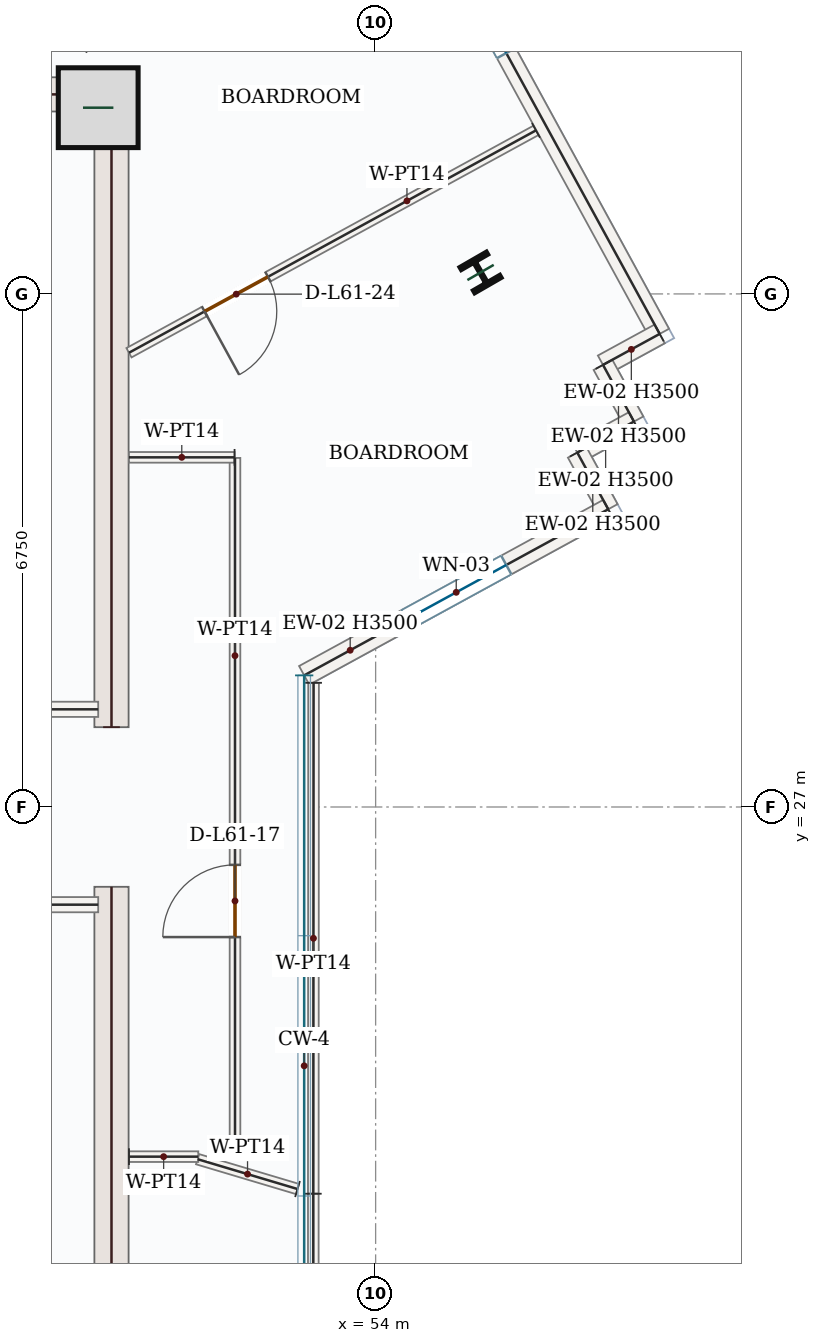
"""IFC4 building model, lengths in metres.
Left out: names, types, materials, properties, quantities, classifications, styles, units other than length and angle.
Written with IfcOpenShell. Run it as: python <this file> out.ifc"""

import sys

from ifc_helpers import new_model, si_unit, direction, frame, frame_2d, origin, origin_2d, place, context, subcontext, project, spatial, rectangle, i_section, extrude, source, transform, mapped, element, fill, save


model = new_model("IFC4")
c1 = context("Model", 3, precision=1e-05, world=origin(), true_north=direction((0.0, 1.0)))
c2 = subcontext(c1, "Body", "Model", "MODEL_VIEW")
j1 = project(units=[si_unit("LENGTHUNIT", "METRE"), si_unit("PLANEANGLEUNIT", "RADIAN")], contexts=[c1])
p1 = place(None, origin())
s1 = spatial("IfcSite", under=j1, at=p1, CompositionType="ELEMENT")
p2 = place(p1, origin())
s2 = spatial("IfcBuilding", under=s1, at=p2, CompositionType="ELEMENT")
p3 = place(p2, frame((0.0, 0.0, 257.85)))
s3 = spatial("IfcBuildingStorey", under=s2, at=p3, CompositionType="ELEMENT", Elevation=257.85)
m1 = source(origin(), c2, "Body", "SweptSolid", [
    extrude(rectangle(XDim=8.55, YDim=0.45, at=frame_2d((4.275, 0.0))), origin(), (0.0, 0.0, 1.0), 3.5),
])
for number, where, z_axis, x_axis in (
    (1, (50.525, 17.4, 0.0), (0.0, 0.0, 1.0), (0.0, 1.0, 0.0)),
    (2, (50.525, 28.05, 0.0), (0.0, 0.0, 1.0), (0.0, 1.0, 0.0)),
):
    element("IfcWall", number, at=place(p3, frame(where, z_axis=z_axis, x_axis=x_axis)), inside=s3, PredefinedType="SHEAR", context=c2, shape_type="MappedRepresentation", body=[
        mapped(m1, transform((0.0, 0.0, 0.0), x_axis=(1.0, 0.0, 0.0), y_axis=(0.0, 1.0, 0.0), z_axis=(0.0, 0.0, 1.0), scale=1.0)),
    ])
m2 = source(origin(), c2, "Body", "SweptSolid", [
    extrude(rectangle(XDim=7.1, YDim=0.45, at=frame_2d((3.55, 0.0))), origin(), (0.0, 0.0, 1.0), 3.5),
])
p4 = place(p3, frame((43.2, 36.375, 0.0), z_axis=(0.0, 0.0, 1.0), x_axis=(1.0, 0.0, 0.0)))
e3 = element("IfcWall", 3, at=p4, inside=s3, PredefinedType="SHEAR", context=c2, shape_type="MappedRepresentation", body=[
    mapped(m2, transform((0.0, 0.0, 0.0), x_axis=(1.0, 0.0, 0.0), y_axis=(0.0, 1.0, 0.0), z_axis=(0.0, 0.0, 1.0), scale=1.0)),
])
m3 = source(origin(), c2, "Body", "SweptSolid", [
    extrude(rectangle(XDim=1.05, YDim=1.05, at=origin_2d()), origin(), (0.0, 0.0, 1.0), 3.75),
])
p5 = place(p3, frame((50.35, 36.2, 0.0), z_axis=(0.0, 0.0, 1.0), x_axis=(1.0, 0.0, 0.0)))
e4 = element("IfcColumn", 4, at=p5, inside=s3, PredefinedType="COLUMN", context=c2, shape_type="MappedRepresentation", body=[
    mapped(m3, transform((0.0, 0.0, 0.0), x_axis=(1.0, 0.0, 0.0), y_axis=(0.0, 1.0, 0.0), z_axis=(0.0, 0.0, 1.0), scale=1.0)),
])
m4 = source(origin(), c2, "Body", "SweptSolid", [
    extrude(i_section(OverallWidth=0.399, OverallDepth=0.386, WebThickness=0.021, FlangeThickness=0.033, FilletRadius=0.018, at=origin_2d()), origin(), (0.0, 0.0, 1.0), 3.75),
])
p6 = place(p3, frame((55.38, 34.032, 0.0), z_axis=(0.0, 0.0, 1.0), x_axis=(0.866025403784, 0.5, 0.0)))
e5 = element("IfcColumn", 5, at=p6, inside=s3, PredefinedType="COLUMN", context=c2, shape_type="MappedRepresentation", body=[
    mapped(m4, transform((0.0, 0.0, 0.0), x_axis=(1.0, 0.0, 0.0), y_axis=(0.0, 1.0, 0.0), z_axis=(0.0, 0.0, 1.0), scale=1.0)),
])
p7 = place(p3, frame((52.981, 41.929, 0.0), z_axis=(0.0, 0.0, 1.0), x_axis=(0.479472774144, -0.877556755347, 0.0)))
e6 = element("IfcWall", 6, at=p7, inside=s3, PredefinedType="SOLIDWALL", context=c2, shape_type="SweptSolid", body=[
    extrude(rectangle(XDim=9.92, YDim=0.28, at=frame_2d((4.96, 0.0))), origin(), (0.0, 0.0, 1.0), 3.5),
])
p8 = place(p7, frame((4.21, 0.0, 0.85)))
e7 = element("IfcOpeningElement", 7, at=p8, cuts=e6, PredefinedType="OPENING", context=c2, shape_type="SweptSolid", body=[
    extrude(rectangle(XDim=1.5, YDim=1.5, at=frame_2d((0.75, 0.75))), frame((0.0, 0.15, 0.0), z_axis=(0.0, -1.0, 0.0), x_axis=(1.0, 0.0, 0.0)), (0.0, 0.0, 1.0), 0.3),
])
m5 = source(origin(), c2, "Body", "SweptSolid", [
    extrude(rectangle(XDim=0.85, YDim=0.28, at=frame_2d((0.425, 0.0))), origin(), (0.0, 0.0, 1.0), 3.5),
])
p9 = place(p3, frame((57.737, 33.224, 0.0), z_axis=(0.0, 0.0, 1.0), x_axis=(-0.87752219781, -0.479536017782, 0.0)))
e8 = element("IfcWall", 8, at=p9, inside=s3, PredefinedType="SOLIDWALL", context=c2, shape_type="MappedRepresentation", body=[
    mapped(m5, transform((0.0, 0.0, 0.0), x_axis=(1.0, 0.0, 0.0), y_axis=(0.0, 1.0, 0.0), z_axis=(0.0, 0.0, 1.0), scale=1.0)),
])
m6 = source(origin(), c2, "Body", "SweptSolid", [
    extrude(rectangle(XDim=0.85, YDim=0.28, at=frame_2d((0.425, 0.0))), origin(), (0.0, 0.0, 1.0), 3.5),
])
for number, where, z_axis, x_axis in (
    (9, (56.991, 32.816, 0.0), (0.0, 0.0, 1.0), (0.479, -0.878, 0.0)),
    (10, (57.399, 32.071, 0.0), (0.0, 0.0, 1.0), (-0.878, -0.479, 0.0)),
):
    element("IfcWall", number, at=place(p3, frame(where, z_axis=z_axis, x_axis=x_axis)), inside=s3, PredefinedType="SOLIDWALL", context=c2, shape_type="MappedRepresentation", body=[
        mapped(m6, transform((0.0, 0.0, 0.0), x_axis=(1.0, 0.0, 0.0), y_axis=(0.0, 1.0, 0.0), z_axis=(0.0, 0.0, 1.0), scale=1.0)),
    ])
m7 = source(origin(), c2, "Body", "SweptSolid", [
    extrude(rectangle(XDim=0.85, YDim=0.28, at=frame_2d((0.425, 0.0))), origin(), (0.0, 0.0, 1.0), 3.5),
])
p10 = place(p3, frame((56.653, 31.663, 0.0), z_axis=(0.0, 0.0, 1.0), x_axis=(0.479314855696, -0.877643019177, 0.0)))
e11 = element("IfcWall", 11, at=p10, inside=s3, PredefinedType="SOLIDWALL", context=c2, shape_type="MappedRepresentation", body=[
    mapped(m7, transform((0.0, 0.0, 0.0), x_axis=(1.0, 0.0, 0.0), y_axis=(0.0, 1.0, 0.0), z_axis=(0.0, 0.0, 1.0), scale=1.0)),
])
p11 = place(p3, frame((57.06, 30.917, 0.0), z_axis=(0.0, 0.0, 1.0), x_axis=(-0.877563774399, -0.479459927276, 0.0)))
e12 = element("IfcWall", 12, at=p11, inside=s3, PredefinedType="SOLIDWALL", context=c2, shape_type="SweptSolid", body=[
    extrude(rectangle(XDim=4.558, YDim=0.28, at=frame_2d((2.279, 0.0))), origin(), (0.0, 0.0, 1.0), 3.5),
])
p12 = place(p11, frame((1.529, 0.0, 0.85)))
e13 = element("IfcOpeningElement", 13, at=p12, cuts=e12, PredefinedType="OPENING", context=c2, shape_type="SweptSolid", body=[
    extrude(rectangle(XDim=1.5, YDim=1.5, at=frame_2d((0.75, 0.75))), frame((0.0, 0.15, 0.0), z_axis=(0.0, -1.0, 0.0), x_axis=(1.0, 0.0, 0.0)), (0.0, 0.0, 1.0), 0.3),
])
m8 = source(origin(), c2, "Body", "SweptSolid", [
    extrude(rectangle(XDim=4.25, YDim=0.2, at=frame_2d((2.125, 0.0))), origin(), (0.0, 0.0, 1.0), 3.5),
])
for number, where, z_axis, x_axis in (
    (14, (46.1, 25.715, 0.0), (0.0, 0.0, 1.0), (1.0, 0.0, 0.0)),
    (15, (46.1, 28.285, 0.0), (0.0, 0.0, 1.0), (1.0, 0.0, 0.0)),
):
    element("IfcWall", number, at=place(p3, frame(where, z_axis=z_axis, x_axis=x_axis)), inside=s3, PredefinedType="SOLIDWALL", context=c2, shape_type="MappedRepresentation", body=[
        mapped(m8, transform((0.0, 0.0, 0.0), x_axis=(1.0, 0.0, 0.0), y_axis=(0.0, 1.0, 0.0), z_axis=(0.0, 0.0, 1.0), scale=1.0)),
    ])
p13 = place(p3, frame((56.109, 35.901, 0.0), z_axis=(0.0, 0.0, 1.0), x_axis=(-0.877574248726, -0.479440755436, 0.0)))
e16 = element("IfcWall", 16, at=p13, inside=s3, PredefinedType="PARTITIONING", context=c2, shape_type="SweptSolid", body=[
    extrude(rectangle(XDim=6.102, YDim=0.14, at=frame_2d((3.051, 0.0))), origin(), (0.0, 0.0, 1.0), 3.5),
])
p14 = place(p13, frame((4.018, 0.0, 0.0)))
e17 = element("IfcOpeningElement", 17, at=p14, cuts=e16, PredefinedType="OPENING", context=c2, shape_type="SweptSolid", body=[
    extrude(rectangle(XDim=0.95, YDim=2.15, at=frame_2d((0.475, 1.075))), frame((0.0, 0.08, 0.0), z_axis=(0.0, -1.0, 0.0), x_axis=(1.0, 0.0, 0.0)), (0.0, 0.0, 1.0), 0.16),
])
p15 = place(p3, frame((52.15, 22.406, 0.0), z_axis=(0.0, 0.0, 1.0), x_axis=(-2.657666e-05, 0.999999999647, 0.0)))
e18 = element("IfcWall", 18, at=p15, inside=s3, PredefinedType="PARTITIONING", context=c2, shape_type="SweptSolid", body=[
    extrude(rectangle(XDim=9.186, YDim=0.14, at=frame_2d((4.593, 0.0))), origin(), (0.0, 0.0, 1.0), 3.5),
])
p16 = place(p15, frame((2.883, 0.0, 0.0)))
e19 = element("IfcOpeningElement", 19, at=p16, cuts=e18, PredefinedType="OPENING", context=c2, shape_type="SweptSolid", body=[
    extrude(rectangle(XDim=0.95, YDim=2.15, at=frame_2d((0.475, 1.075))), frame((0.0, 0.08, 0.0), z_axis=(0.0, -1.0, 0.0), x_axis=(1.0, 0.0, 0.0)), (0.0, 0.0, 1.0), 0.16),
])
m9 = source(origin(), c2, "Body", "SweptSolid", [
    extrude(rectangle(XDim=1.389, YDim=0.14, at=frame_2d((0.695, 0.0))), origin(), (0.0, 0.0, 1.0), 3.5),
])
p17 = place(p3, frame((52.144, 31.6, 0.0), z_axis=(0.0, 0.0, 1.0), x_axis=(-1.0, 0.0, 0.0)))
e20 = element("IfcWall", 20, at=p17, inside=s3, PredefinedType="PARTITIONING", context=c2, shape_type="MappedRepresentation", body=[
    mapped(m9, transform((0.0, 0.0, 0.0), x_axis=(1.0, 0.0, 0.0), y_axis=(0.0, 1.0, 0.0), z_axis=(0.0, 0.0, 1.0), scale=1.0)),
])
m10 = source(origin(), c2, "Body", "SweptSolid", [
    extrude(rectangle(XDim=6.722, YDim=0.14, at=frame_2d((3.361, 0.0))), origin(), (0.0, 0.0, 1.0), 3.5),
])
p18 = place(p3, frame((53.184, 28.634, 0.0), z_axis=(0.0, 0.0, 1.0), x_axis=(-0.000544820492, -0.999999851585, 0.0)))
e21 = element("IfcWall", 21, at=p18, inside=s3, PredefinedType="PARTITIONING", context=c2, shape_type="MappedRepresentation", body=[
    mapped(m10, transform((0.0, 0.0, 0.0), x_axis=(1.0, 0.0, 0.0), y_axis=(0.0, 1.0, 0.0), z_axis=(0.0, 0.0, 1.0), scale=1.0)),
])
m11 = source(origin(), c2, "Body", "SweptSolid", [
    extrude(rectangle(XDim=1.373, YDim=0.14, at=frame_2d((0.687, 0.0))), origin(), (0.0, 0.0, 1.0), 3.5),
])
p19 = place(p3, frame((52.972, 21.974, 0.0), z_axis=(0.0, 0.0, 1.0), x_axis=(-0.958236472503, 0.285977031883, 0.0)))
e22 = element("IfcWall", 22, at=p19, inside=s3, PredefinedType="PARTITIONING", context=c2, shape_type="MappedRepresentation", body=[
    mapped(m11, transform((0.0, 0.0, 0.0), x_axis=(1.0, 0.0, 0.0), y_axis=(0.0, 1.0, 0.0), z_axis=(0.0, 0.0, 1.0), scale=1.0)),
])
m12 = source(origin(), c2, "Body", "SweptSolid", [
    extrude(rectangle(XDim=0.912, YDim=0.14, at=frame_2d((0.456, 0.0))), origin(), (0.0, 0.0, 1.0), 3.5),
])
p20 = place(p3, frame((50.755, 22.4, 0.0), z_axis=(0.0, 0.0, 1.0), x_axis=(1.0, 0.0, 0.0)))
e23 = element("IfcWall", 23, at=p20, inside=s3, PredefinedType="PARTITIONING", context=c2, shape_type="MappedRepresentation", body=[
    mapped(m12, transform((0.0, 0.0, 0.0), x_axis=(1.0, 0.0, 0.0), y_axis=(0.0, 1.0, 0.0), z_axis=(0.0, 0.0, 1.0), scale=1.0)),
])
m13 = source(origin(), c2, "Body", "SweptSolid", [
    extrude(rectangle(XDim=3.504, YDim=0.14, at=frame_2d((1.752, 0.0))), origin(), (0.0, 0.0, 1.0), 3.5),
])
p21 = place(p3, frame((53.18, 21.912, 0.0), z_axis=(0.0, 0.0, 1.0), x_axis=(0.0, -1.0, 0.0)))
e24 = element("IfcWall", 24, at=p21, inside=s3, PredefinedType="PARTITIONING", context=c2, shape_type="MappedRepresentation", body=[
    mapped(m13, transform((0.0, 0.0, 0.0), x_axis=(1.0, 0.0, 0.0), y_axis=(0.0, 1.0, 0.0), z_axis=(0.0, 0.0, 1.0), scale=1.0)),
])
m14 = source(origin(), c2, "Body", "SweptSolid", [
    extrude(rectangle(XDim=1.5, YDim=1.5, at=frame_2d((0.75, 0.75))), frame((0.0, 0.03, 0.0), z_axis=(0.0, -1.0, 0.0), x_axis=(1.0, 0.0, 0.0)), (0.0, 0.0, 1.0), 0.06),
])
p22 = place(p8, origin())
e25 = element("IfcWindow", 25, at=p22, inside=s3, PartitioningType="SINGLE_PANEL", PredefinedType="WINDOW", context=c2, shape_type="MappedRepresentation", body=[
    mapped(m14, transform((0.0, 0.0, 0.0), x_axis=(1.0, 0.0, 0.0), y_axis=(0.0, 1.0, 0.0), z_axis=(0.0, 0.0, 1.0), scale=1.0)),
])
fill(e7, e25)
p23 = place(p12, origin())
e26 = element("IfcWindow", 26, at=p23, inside=s3, PartitioningType="SINGLE_PANEL", PredefinedType="WINDOW", context=c2, shape_type="MappedRepresentation", body=[
    mapped(m14, transform((0.0, 0.0, 0.0), x_axis=(1.0, 0.0, 0.0), y_axis=(0.0, 1.0, 0.0), z_axis=(0.0, 0.0, 1.0), scale=1.0)),
])
fill(e13, e26)
m15 = source(origin(), c2, "Body", "SweptSolid", [
    extrude(rectangle(XDim=0.95, YDim=2.15, at=frame_2d((0.475, 1.075))), frame((0.0, 0.025, 0.0), z_axis=(0.0, -1.0, 0.0), x_axis=(1.0, 0.0, 0.0)), (0.0, 0.0, 1.0), 0.05),
])
p24 = place(p16, origin())
e27 = element("IfcDoor", 27, at=p24, inside=s3, OperationType="SINGLE_SWING_LEFT", PredefinedType="DOOR", context=c2, shape_type="MappedRepresentation", body=[
    mapped(m15, transform((0.0, 0.0, 0.0), x_axis=(1.0, 0.0, 0.0), y_axis=(0.0, 1.0, 0.0), z_axis=(0.0, 0.0, 1.0), scale=1.0)),
])
fill(e19, e27)
p25 = place(p14, origin())
e28 = element("IfcDoor", 28, at=p25, inside=s3, OperationType="SINGLE_SWING_RIGHT", PredefinedType="DOOR", context=c2, shape_type="MappedRepresentation", body=[
    mapped(m15, transform((0.0, 0.0, 0.0), x_axis=(1.0, 0.0, 0.0), y_axis=(0.0, 1.0, 0.0), z_axis=(0.0, 0.0, 1.0), scale=1.0)),
])
fill(e17, e28)
save(model, sys.argv[1])
